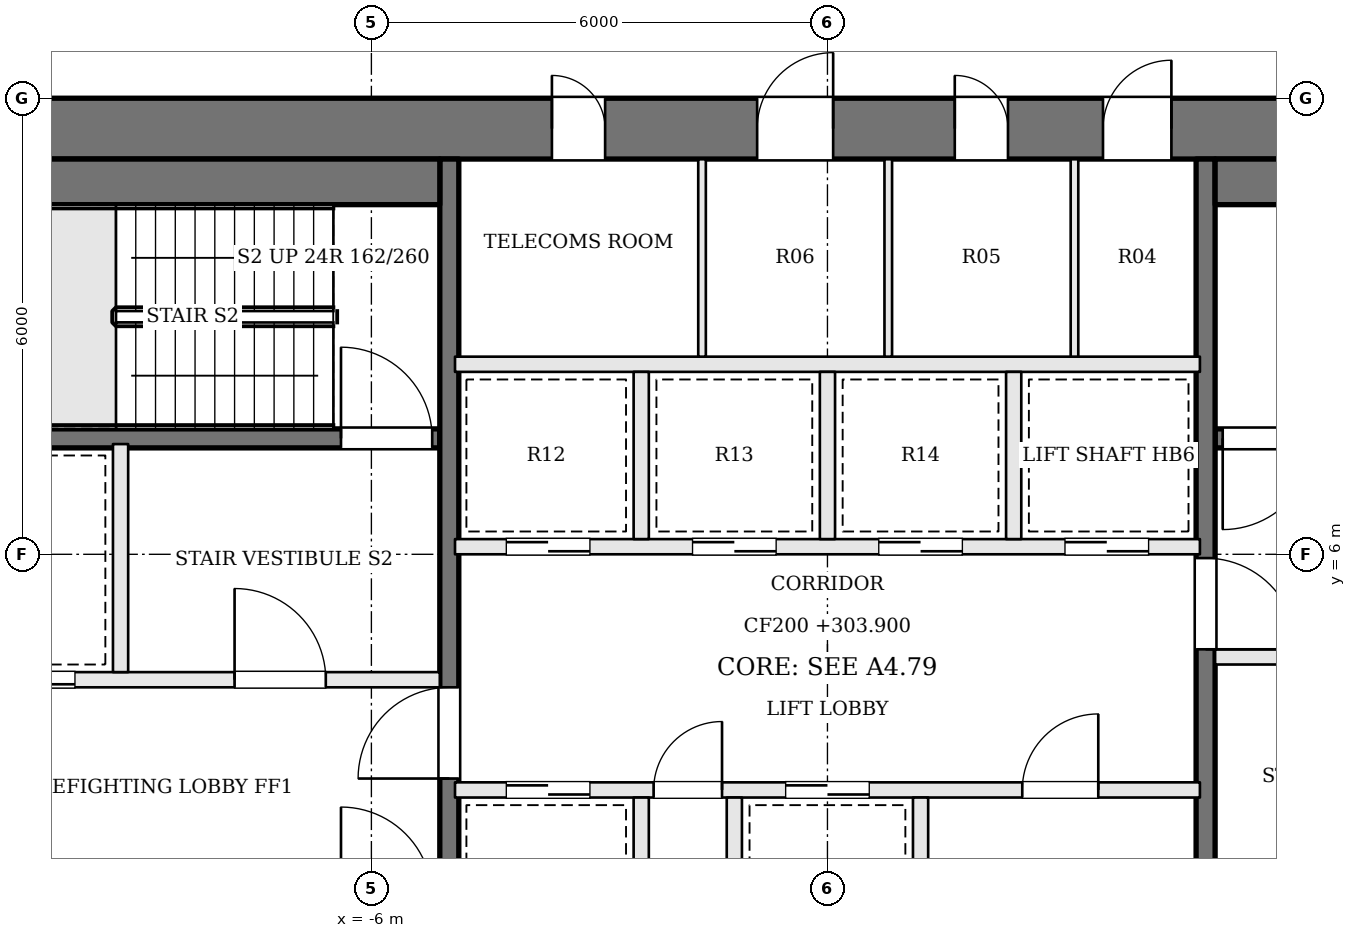
"""IFC4 building model, lengths in metres.
Left out: names, types, materials, properties, quantities, classifications, styles, units other than length and angle.
Written with IfcOpenShell. Run it as: python <this file> out.ifc"""

import sys

from ifc_helpers import new_model, si_unit, direction, frame, frame_2d, origin, place, context, subcontext, project, spatial, rectangle, extrude, element, fill, save


model = new_model("IFC4")
c1 = context("Model", 3, precision=1e-05, world=origin(), true_north=direction((0.0, 1.0)))
c2 = subcontext(c1, "Body", "Model", "MODEL_VIEW")
j1 = project(units=[si_unit("LENGTHUNIT", "METRE"), si_unit("PLANEANGLEUNIT", "RADIAN")], contexts=[c1])
p1 = place(None, origin())
s1 = spatial("IfcSite", under=j1, at=p1, CompositionType="ELEMENT")
p2 = place(p1, origin())
s2 = spatial("IfcBuilding", under=s1, at=p2, CompositionType="ELEMENT")
p3 = place(p2, frame((0.0, 0.0, 303.9)))
s3 = spatial("IfcBuildingStorey", under=s2, at=p3, CompositionType="ELEMENT", Elevation=303.9)
p4 = place(p3, frame((-13.0, 11.6, 0.0), z_axis=(0.0, 0.0, 1.0), x_axis=(1.0, 0.0, 0.0)))
e1 = element("IfcWall", 1, at=p4, inside=s3, PredefinedType="SHEAR", context=c2, shape_type="SweptSolid", body=[
    extrude(rectangle(XDim=26.0, YDim=0.8, at=frame_2d((13.0, 0.0))), origin(), (0.0, 0.0, 1.0), 3.9),
])
p5 = place(p4, frame((9.375, 0.0, 0.0)))
e2 = element("IfcOpeningElement", 2, at=p5, cuts=e1, PredefinedType="OPENING", context=c2, shape_type="SweptSolid", body=[
    extrude(rectangle(XDim=0.7, YDim=2.1, at=frame_2d((0.35, 1.05))), frame((0.0, 0.41, 0.0), z_axis=(0.0, -1.0, 0.0), x_axis=(1.0, 0.0, 0.0)), (0.0, 0.0, 1.0), 0.82),
])
p6 = place(p4, frame((12.075, 0.0, 0.0)))
e3 = element("IfcOpeningElement", 3, at=p6, cuts=e1, PredefinedType="OPENING", context=c2, shape_type="SweptSolid", body=[
    extrude(rectangle(XDim=1.0, YDim=2.1, at=frame_2d((0.5, 1.05))), frame((0.0, 0.41, 0.0), z_axis=(0.0, -1.0, 0.0), x_axis=(1.0, 0.0, 0.0)), (0.0, 0.0, 1.0), 0.82),
])
p7 = place(p4, frame((14.675, 0.0, 0.0)))
e4 = element("IfcOpeningElement", 4, at=p7, cuts=e1, PredefinedType="OPENING", context=c2, shape_type="SweptSolid", body=[
    extrude(rectangle(XDim=0.7, YDim=2.1, at=frame_2d((0.35, 1.05))), frame((0.0, 0.41, 0.0), z_axis=(0.0, -1.0, 0.0), x_axis=(1.0, 0.0, 0.0)), (0.0, 0.0, 1.0), 0.82),
])
p8 = place(p4, frame((16.625, 0.0, 0.0)))
e5 = element("IfcOpeningElement", 5, at=p8, cuts=e1, PredefinedType="OPENING", context=c2, shape_type="SweptSolid", body=[
    extrude(rectangle(XDim=0.9, YDim=2.1, at=frame_2d((0.45, 1.05))), frame((0.0, 0.41, 0.0), z_axis=(0.0, -1.0, 0.0), x_axis=(1.0, 0.0, 0.0)), (0.0, 0.0, 1.0), 0.82),
])
p9 = place(p3, frame((12.2, 7.525, 0.0), z_axis=(0.0, 0.0, 1.0), x_axis=(-1.0, 0.0, 0.0)))
e6 = element("IfcWall", 6, at=p9, inside=s3, PredefinedType="SOLIDWALL", context=c2, shape_type="SweptSolid", body=[
    extrude(rectangle(XDim=7.1, YDim=0.25, at=frame_2d((3.55, 0.0))), origin(), (0.0, 0.0, 1.0), 3.7),
])
p10 = place(p9, frame((5.8, 0.0, 0.0)))
e7 = element("IfcOpeningElement", 7, at=p10, cuts=e6, PredefinedType="OPENING", context=c2, shape_type="SweptSolid", body=[
    extrude(rectangle(XDim=1.2, YDim=2.1, at=frame_2d((0.6, 1.05))), frame((0.0, 0.135, 0.0), z_axis=(0.0, -1.0, 0.0), x_axis=(1.0, 0.0, 0.0)), (0.0, 0.0, 1.0), 0.27),
])
p11 = place(p3, frame((-12.2, 4.35, 0.0), z_axis=(0.0, 0.0, 1.0), x_axis=(1.0, 0.0, 0.0)))
e8 = element("IfcWall", 8, at=p11, inside=s3, PredefinedType="SOLIDWALL", context=c2, shape_type="SweptSolid", body=[
    extrude(rectangle(XDim=7.1, YDim=0.2, at=frame_2d((3.55, 0.0))), origin(), (0.0, 0.0, 1.0), 3.7),
])
p12 = place(p11, frame((4.4, 0.0, 0.0)))
e9 = element("IfcOpeningElement", 9, at=p12, cuts=e8, PredefinedType="OPENING", context=c2, shape_type="SweptSolid", body=[
    extrude(rectangle(XDim=1.2, YDim=2.1, at=frame_2d((0.6, 1.05))), frame((0.0, 0.11, 0.0), z_axis=(0.0, -1.0, 0.0), x_axis=(1.0, 0.0, 0.0)), (0.0, 0.0, 1.0), 0.22),
])
p13 = place(p11, frame((1.1, 0.0, 0.0)))
e10 = element("IfcOpeningElement", 10, at=p13, cuts=e8, PredefinedType="OPENING", context=c2, shape_type="SweptSolid", body=[
    extrude(rectangle(XDim=1.2, YDim=2.1, at=frame_2d((0.6, 1.05))), frame((0.0, 0.11, 0.0), z_axis=(0.0, -1.0, 0.0), x_axis=(1.0, 0.0, 0.0)), (0.0, 0.0, 1.0), 0.22),
])
p14 = place(p3, frame((12.2, 4.65, 0.0), z_axis=(0.0, 0.0, 1.0), x_axis=(-1.0, 0.0, 0.0)))
e11 = element("IfcWall", 11, at=p14, inside=s3, PredefinedType="SOLIDWALL", context=c2, shape_type="SweptSolid", body=[
    extrude(rectangle(XDim=7.1, YDim=0.2, at=frame_2d((3.55, 0.0))), origin(), (0.0, 0.0, 1.0), 3.7),
])
p15 = place(p14, frame((4.4, 0.0, 0.0)))
e12 = element("IfcOpeningElement", 12, at=p15, cuts=e11, PredefinedType="OPENING", context=c2, shape_type="SweptSolid", body=[
    extrude(rectangle(XDim=1.2, YDim=2.1, at=frame_2d((0.6, 1.05))), frame((0.0, 0.11, 0.0), z_axis=(0.0, -1.0, 0.0), x_axis=(1.0, 0.0, 0.0)), (0.0, 0.0, 1.0), 0.22),
])
p16 = place(p14, frame((1.1, 0.0, 0.0)))
e13 = element("IfcOpeningElement", 13, at=p16, cuts=e11, PredefinedType="OPENING", context=c2, shape_type="SweptSolid", body=[
    extrude(rectangle(XDim=1.2, YDim=2.1, at=frame_2d((0.6, 1.05))), frame((0.0, 0.11, 0.0), z_axis=(0.0, -1.0, 0.0), x_axis=(1.0, 0.0, 0.0)), (0.0, 0.0, 1.0), 0.22),
])
p17 = place(p3, frame((-12.2, 7.525, 0.0), z_axis=(0.0, 0.0, 1.0), x_axis=(1.0, 0.0, 0.0)))
e14 = element("IfcWall", 14, at=p17, inside=s3, PredefinedType="SOLIDWALL", context=c2, shape_type="SweptSolid", body=[
    extrude(rectangle(XDim=7.1, YDim=0.25, at=frame_2d((3.55, 0.0))), origin(), (0.0, 0.0, 1.0), 3.7),
])
p18 = place(p17, frame((5.8, 0.0, 0.0)))
e15 = element("IfcOpeningElement", 15, at=p18, cuts=e14, PredefinedType="OPENING", context=c2, shape_type="SweptSolid", body=[
    extrude(rectangle(XDim=1.2, YDim=2.1, at=frame_2d((0.6, 1.05))), frame((0.0, 0.135, 0.0), z_axis=(0.0, -1.0, 0.0), x_axis=(1.0, 0.0, 0.0)), (0.0, 0.0, 1.0), 0.27),
])
p19 = place(p3, frame((-9.3, 4.45, 0.0), z_axis=(0.0, 0.0, 1.0), x_axis=(0.0, 1.0, 0.0)))
e16 = element("IfcWall", 16, at=p19, inside=s3, PredefinedType="SOLIDWALL", context=c2, shape_type="SweptSolid", body=[
    extrude(rectangle(XDim=3.0, YDim=0.2, at=frame_2d((1.5, 0.0))), origin(), (0.0, 0.0, 1.0), 3.7),
])
p20 = place(p3, frame((-4.975, -2.2, 0.0), z_axis=(0.0, 0.0, 1.0), x_axis=(0.0, 1.0, 0.0)))
e17 = element("IfcWall", 17, at=p20, inside=s3, PredefinedType="SOLIDWALL", context=c2, shape_type="SweptSolid", body=[
    extrude(rectangle(XDim=13.4, YDim=0.25, at=frame_2d((6.7, 0.0))), origin(), (0.0, 0.0, 1.0), 3.7),
])
p21 = place(p20, frame((5.25, 0.0, 0.0)))
e18 = element("IfcOpeningElement", 18, at=p21, cuts=e17, PredefinedType="OPENING", context=c2, shape_type="SweptSolid", body=[
    extrude(rectangle(XDim=1.2, YDim=2.1, at=frame_2d((0.6, 1.05))), frame((0.0, 0.135, 0.0), z_axis=(0.0, -1.0, 0.0), x_axis=(1.0, 0.0, 0.0)), (0.0, 0.0, 1.0), 0.27),
])
p22 = place(p3, frame((4.975, 11.2, 0.0), z_axis=(0.0, 0.0, 1.0), x_axis=(0.0, -1.0, 0.0)))
e19 = element("IfcWall", 19, at=p22, inside=s3, PredefinedType="SOLIDWALL", context=c2, shape_type="SweptSolid", body=[
    extrude(rectangle(XDim=13.4, YDim=0.25, at=frame_2d((6.7, 0.0))), origin(), (0.0, 0.0, 1.0), 3.7),
])
p23 = place(p22, frame((5.25, 0.0, 0.0)))
e20 = element("IfcOpeningElement", 20, at=p23, cuts=e19, PredefinedType="OPENING", context=c2, shape_type="SweptSolid", body=[
    extrude(rectangle(XDim=1.2, YDim=2.1, at=frame_2d((0.6, 1.05))), frame((0.0, 0.135, 0.0), z_axis=(0.0, -1.0, 0.0), x_axis=(1.0, 0.0, 0.0)), (0.0, 0.0, 1.0), 0.27),
])
for number, where, z_axis, x_axis in (
    (21, (-12.2, 10.9, 0.0), (0.0, 0.0, 1.0), (1.0, 0.0, 0.0)),
    (22, (12.2, 10.9, 0.0), (0.0, 0.0, 1.0), (-1.0, 0.0, 0.0)),
):
    element("IfcWall", number, at=place(p3, frame(where, z_axis=z_axis, x_axis=x_axis)), inside=s3, PredefinedType="SOLIDWALL", context=c2, shape_type="SweptSolid", body=[
        extrude(rectangle(XDim=7.1, YDim=0.6, at=frame_2d((3.55, 0.0))), origin(), (0.0, 0.0, 1.0), 3.7),
    ])
p24 = place(p3, frame((-4.9, 2.9, 0.0), z_axis=(0.0, 0.0, 1.0), x_axis=(1.0, 0.0, 0.0)))
e23 = element("IfcWall", 23, at=p24, inside=s3, PredefinedType="SOLIDWALL", context=c2, shape_type="SweptSolid", body=[
    extrude(rectangle(XDim=9.8, YDim=0.2, at=frame_2d((4.9, 0.0))), origin(), (0.0, 0.0, 1.0), 3.7),
])
p25 = place(p24, frame((0.675, 0.0, 0.0)))
e24 = element("IfcOpeningElement", 24, at=p25, cuts=e23, PredefinedType="OPENING", context=c2, shape_type="SweptSolid", body=[
    extrude(rectangle(XDim=1.1, YDim=2.1, at=frame_2d((0.55, 1.05))), frame((0.0, 0.11, 0.0), z_axis=(0.0, -1.0, 0.0), x_axis=(1.0, 0.0, 0.0)), (0.0, 0.0, 1.0), 0.22),
])
p26 = place(p24, frame((2.613, 0.0, 0.0)))
e25 = element("IfcOpeningElement", 25, at=p26, cuts=e23, PredefinedType="OPENING", context=c2, shape_type="SweptSolid", body=[
    extrude(rectangle(XDim=0.9, YDim=2.1, at=frame_2d((0.45, 1.05))), frame((0.0, 0.11, 0.0), z_axis=(0.0, -1.0, 0.0), x_axis=(1.0, 0.0, 0.0)), (0.0, 0.0, 1.0), 0.22),
])
p27 = place(p24, frame((4.35, 0.0, 0.0)))
e26 = element("IfcOpeningElement", 26, at=p27, cuts=e23, PredefinedType="OPENING", context=c2, shape_type="SweptSolid", body=[
    extrude(rectangle(XDim=1.1, YDim=2.1, at=frame_2d((0.55, 1.05))), frame((0.0, 0.11, 0.0), z_axis=(0.0, -1.0, 0.0), x_axis=(1.0, 0.0, 0.0)), (0.0, 0.0, 1.0), 0.22),
])
p28 = place(p24, frame((7.463, 0.0, 0.0)))
e27 = element("IfcOpeningElement", 27, at=p28, cuts=e23, PredefinedType="OPENING", context=c2, shape_type="SweptSolid", body=[
    extrude(rectangle(XDim=1.0, YDim=2.1, at=frame_2d((0.5, 1.05))), frame((0.0, 0.11, 0.0), z_axis=(0.0, -1.0, 0.0), x_axis=(1.0, 0.0, 0.0)), (0.0, 0.0, 1.0), 0.22),
])
p29 = place(p3, frame((-4.9, 6.1, 0.0), z_axis=(0.0, 0.0, 1.0), x_axis=(1.0, 0.0, 0.0)))
e28 = element("IfcWall", 28, at=p29, inside=s3, PredefinedType="SOLIDWALL", context=c2, shape_type="SweptSolid", body=[
    extrude(rectangle(XDim=9.8, YDim=0.2, at=frame_2d((4.9, 0.0))), origin(), (0.0, 0.0, 1.0), 3.7),
])
p30 = place(p29, frame((0.675, 0.0, 0.0)))
e29 = element("IfcOpeningElement", 29, at=p30, cuts=e28, PredefinedType="OPENING", context=c2, shape_type="SweptSolid", body=[
    extrude(rectangle(XDim=1.1, YDim=2.1, at=frame_2d((0.55, 1.05))), frame((0.0, 0.11, 0.0), z_axis=(0.0, -1.0, 0.0), x_axis=(1.0, 0.0, 0.0)), (0.0, 0.0, 1.0), 0.22),
])
p31 = place(p29, frame((3.125, 0.0, 0.0)))
e30 = element("IfcOpeningElement", 30, at=p31, cuts=e28, PredefinedType="OPENING", context=c2, shape_type="SweptSolid", body=[
    extrude(rectangle(XDim=1.1, YDim=2.1, at=frame_2d((0.55, 1.05))), frame((0.0, 0.11, 0.0), z_axis=(0.0, -1.0, 0.0), x_axis=(1.0, 0.0, 0.0)), (0.0, 0.0, 1.0), 0.22),
])
p32 = place(p29, frame((5.575, 0.0, 0.0)))
e31 = element("IfcOpeningElement", 31, at=p32, cuts=e28, PredefinedType="OPENING", context=c2, shape_type="SweptSolid", body=[
    extrude(rectangle(XDim=1.1, YDim=2.1, at=frame_2d((0.55, 1.05))), frame((0.0, 0.11, 0.0), z_axis=(0.0, -1.0, 0.0), x_axis=(1.0, 0.0, 0.0)), (0.0, 0.0, 1.0), 0.22),
])
p33 = place(p29, frame((8.025, 0.0, 0.0)))
e32 = element("IfcOpeningElement", 32, at=p33, cuts=e28, PredefinedType="OPENING", context=c2, shape_type="SweptSolid", body=[
    extrude(rectangle(XDim=1.1, YDim=2.1, at=frame_2d((0.55, 1.05))), frame((0.0, 0.11, 0.0), z_axis=(0.0, -1.0, 0.0), x_axis=(1.0, 0.0, 0.0)), (0.0, 0.0, 1.0), 0.22),
])
p34 = place(p3, frame((-4.9, 8.5, 0.0), z_axis=(0.0, 0.0, 1.0), x_axis=(1.0, 0.0, 0.0)))
e33 = element("IfcWall", 33, at=p34, inside=s3, PredefinedType="SOLIDWALL", context=c2, shape_type="SweptSolid", body=[
    extrude(rectangle(XDim=9.8, YDim=0.2, at=frame_2d((4.9, 0.0))), origin(), (0.0, 0.0, 1.0), 3.7),
])
for number, where, z_axis, x_axis in (
    (34, (-2.45, 0.6, 0.0), (0.0, 0.0, 1.0), (0.0, 1.0, 0.0)),
    (35, (-1.225, 0.6, 0.0), (0.0, 0.0, 1.0), (0.0, 1.0, 0.0)),
    (36, (1.225, 0.6, 0.0), (0.0, 0.0, 1.0), (0.0, 1.0, 0.0)),
    (37, (-2.45, 6.2, 0.0), (0.0, 0.0, 1.0), (0.0, 1.0, 0.0)),
    (38, (0.0, 6.2, 0.0), (0.0, 0.0, 1.0), (0.0, 1.0, 0.0)),
    (39, (2.45, 6.2, 0.0), (0.0, 0.0, 1.0), (0.0, 1.0, 0.0)),
):
    element("IfcWall", number, at=place(p3, frame(where, z_axis=z_axis, x_axis=x_axis)), inside=s3, PredefinedType="SOLIDWALL", context=c2, shape_type="SweptSolid", body=[
        extrude(rectangle(XDim=2.2, YDim=0.2, at=frame_2d((1.1, 0.0))), origin(), (0.0, 0.0, 1.0), 3.7),
    ])
for number, where, z_axis, x_axis in (
    (40, (-1.65, 8.6, 0.0), (0.0, 0.0, 1.0), (0.0, 1.0, 0.0)),
    (41, (0.8, 8.6, 0.0), (0.0, 0.0, 1.0), (0.0, 1.0, 0.0)),
    (42, (3.25, 8.6, 0.0), (0.0, 0.0, 1.0), (0.0, 1.0, 0.0)),
):
    element("IfcWall", number, at=place(p3, frame(where, z_axis=z_axis, x_axis=x_axis)), inside=s3, PredefinedType="PARTITIONING", context=c2, shape_type="SweptSolid", body=[
        extrude(rectangle(XDim=2.6, YDim=0.1, at=frame_2d((1.3, 0.0))), origin(), (0.0, 0.0, 1.0), 3.7),
    ])
p35 = place(p21, origin())
e43 = element("IfcDoor", 43, at=p35, inside=s3, OperationType="SINGLE_SWING_LEFT", PredefinedType="DOOR", context=c2, shape_type="SweptSolid", body=[
    extrude(rectangle(XDim=1.2, YDim=2.1, at=frame_2d((0.6, 1.05))), frame((0.0, 0.025, 0.0), z_axis=(0.0, -1.0, 0.0), x_axis=(1.0, 0.0, 0.0)), (0.0, 0.0, 1.0), 0.05),
])
fill(e18, e43)
p36 = place(p23, origin())
e44 = element("IfcDoor", 44, at=p36, inside=s3, OperationType="SINGLE_SWING_RIGHT", PredefinedType="DOOR", context=c2, shape_type="SweptSolid", body=[
    extrude(rectangle(XDim=1.2, YDim=2.1, at=frame_2d((0.6, 1.05))), frame((0.0, 0.025, 0.0), z_axis=(0.0, -1.0, 0.0), x_axis=(1.0, 0.0, 0.0)), (0.0, 0.0, 1.0), 0.05),
])
fill(e20, e44)
p37 = place(p12, origin())
e45 = element("IfcDoor", 45, at=p37, inside=s3, OperationType="SINGLE_SWING_LEFT", PredefinedType="DOOR", context=c2, shape_type="SweptSolid", body=[
    extrude(rectangle(XDim=1.2, YDim=2.1, at=frame_2d((0.6, 1.05))), frame((0.0, 0.025, 0.0), z_axis=(0.0, -1.0, 0.0), x_axis=(1.0, 0.0, 0.0)), (0.0, 0.0, 1.0), 0.05),
])
fill(e9, e45)
p38 = place(p10, origin())
e46 = element("IfcDoor", 46, at=p38, inside=s3, OperationType="SINGLE_SWING_RIGHT", PredefinedType="DOOR", context=c2, shape_type="SweptSolid", body=[
    extrude(rectangle(XDim=1.2, YDim=2.1, at=frame_2d((0.6, 1.05))), frame((0.0, 0.025, 0.0), z_axis=(0.0, -1.0, 0.0), x_axis=(1.0, 0.0, 0.0)), (0.0, 0.0, 1.0), 0.05),
])
fill(e7, e46)
p39 = place(p18, origin())
e47 = element("IfcDoor", 47, at=p39, inside=s3, OperationType="SINGLE_SWING_LEFT", PredefinedType="DOOR", context=c2, shape_type="SweptSolid", body=[
    extrude(rectangle(XDim=1.2, YDim=2.1, at=frame_2d((0.6, 1.05))), frame((0.0, 0.025, 0.0), z_axis=(0.0, -1.0, 0.0), x_axis=(1.0, 0.0, 0.0)), (0.0, 0.0, 1.0), 0.05),
])
fill(e15, e47)
p40 = place(p13, origin())
e48 = element("IfcDoor", 48, at=p40, inside=s3, OperationType="SLIDING_TO_RIGHT", PredefinedType="DOOR", context=c2, shape_type="SweptSolid", body=[
    extrude(rectangle(XDim=1.2, YDim=2.1, at=frame_2d((0.6, 1.05))), frame((0.0, 0.025, 0.0), z_axis=(0.0, -1.0, 0.0), x_axis=(1.0, 0.0, 0.0)), (0.0, 0.0, 1.0), 0.05),
])
fill(e10, e48)
p41 = place(p25, origin())
e49 = element("IfcDoor", 49, at=p41, inside=s3, OperationType="SLIDING_TO_RIGHT", PredefinedType="DOOR", context=c2, shape_type="SweptSolid", body=[
    extrude(rectangle(XDim=1.1, YDim=2.1, at=frame_2d((0.55, 1.05))), frame((0.0, 0.025, 0.0), z_axis=(0.0, -1.0, 0.0), x_axis=(1.0, 0.0, 0.0)), (0.0, 0.0, 1.0), 0.05),
])
fill(e24, e49)
p42 = place(p26, origin())
e50 = element("IfcDoor", 50, at=p42, inside=s3, OperationType="SINGLE_SWING_RIGHT", PredefinedType="DOOR", context=c2, shape_type="SweptSolid", body=[
    extrude(rectangle(XDim=0.9, YDim=2.1, at=frame_2d((0.45, 1.05))), frame((0.0, 0.025, 0.0), z_axis=(0.0, -1.0, 0.0), x_axis=(1.0, 0.0, 0.0)), (0.0, 0.0, 1.0), 0.05),
])
fill(e25, e50)
p43 = place(p27, origin())
e51 = element("IfcDoor", 51, at=p43, inside=s3, OperationType="SLIDING_TO_LEFT", PredefinedType="DOOR", context=c2, shape_type="SweptSolid", body=[
    extrude(rectangle(XDim=1.1, YDim=2.1, at=frame_2d((0.55, 1.05))), frame((0.0, 0.025, 0.0), z_axis=(0.0, -1.0, 0.0), x_axis=(1.0, 0.0, 0.0)), (0.0, 0.0, 1.0), 0.05),
])
fill(e26, e51)
p44 = place(p28, origin())
e52 = element("IfcDoor", 52, at=p44, inside=s3, OperationType="SINGLE_SWING_RIGHT", PredefinedType="DOOR", context=c2, shape_type="SweptSolid", body=[
    extrude(rectangle(XDim=1.0, YDim=2.1, at=frame_2d((0.5, 1.05))), frame((0.0, 0.025, 0.0), z_axis=(0.0, -1.0, 0.0), x_axis=(1.0, 0.0, 0.0)), (0.0, 0.0, 1.0), 0.05),
])
fill(e27, e52)
p45 = place(p30, origin())
e53 = element("IfcDoor", 53, at=p45, inside=s3, OperationType="SLIDING_TO_RIGHT", PredefinedType="DOOR", context=c2, shape_type="SweptSolid", body=[
    extrude(rectangle(XDim=1.1, YDim=2.1, at=frame_2d((0.55, 1.05))), frame((0.0, 0.025, 0.0), z_axis=(0.0, -1.0, 0.0), x_axis=(1.0, 0.0, 0.0)), (0.0, 0.0, 1.0), 0.05),
])
fill(e29, e53)
p46 = place(p31, origin())
e54 = element("IfcDoor", 54, at=p46, inside=s3, OperationType="SLIDING_TO_LEFT", PredefinedType="DOOR", context=c2, shape_type="SweptSolid", body=[
    extrude(rectangle(XDim=1.1, YDim=2.1, at=frame_2d((0.55, 1.05))), frame((0.0, 0.025, 0.0), z_axis=(0.0, -1.0, 0.0), x_axis=(1.0, 0.0, 0.0)), (0.0, 0.0, 1.0), 0.05),
])
fill(e30, e54)
p47 = place(p32, origin())
e55 = element("IfcDoor", 55, at=p47, inside=s3, OperationType="SLIDING_TO_RIGHT", PredefinedType="DOOR", context=c2, shape_type="SweptSolid", body=[
    extrude(rectangle(XDim=1.1, YDim=2.1, at=frame_2d((0.55, 1.05))), frame((0.0, 0.025, 0.0), z_axis=(0.0, -1.0, 0.0), x_axis=(1.0, 0.0, 0.0)), (0.0, 0.0, 1.0), 0.05),
])
fill(e31, e55)
p48 = place(p33, origin())
e56 = element("IfcDoor", 56, at=p48, inside=s3, OperationType="SLIDING_TO_LEFT", PredefinedType="DOOR", context=c2, shape_type="SweptSolid", body=[
    extrude(rectangle(XDim=1.1, YDim=2.1, at=frame_2d((0.55, 1.05))), frame((0.0, 0.025, 0.0), z_axis=(0.0, -1.0, 0.0), x_axis=(1.0, 0.0, 0.0)), (0.0, 0.0, 1.0), 0.05),
])
fill(e32, e56)
p49 = place(p5, origin())
e57 = element("IfcDoor", 57, at=p49, inside=s3, OperationType="SINGLE_SWING_LEFT", PredefinedType="DOOR", context=c2, shape_type="SweptSolid", body=[
    extrude(rectangle(XDim=0.7, YDim=2.1, at=frame_2d((0.35, 1.05))), frame((0.0, 0.025, 0.0), z_axis=(0.0, -1.0, 0.0), x_axis=(1.0, 0.0, 0.0)), (0.0, 0.0, 1.0), 0.05),
])
fill(e2, e57)
p50 = place(p6, origin())
e58 = element("IfcDoor", 58, at=p50, inside=s3, OperationType="SINGLE_SWING_RIGHT", PredefinedType="DOOR", context=c2, shape_type="SweptSolid", body=[
    extrude(rectangle(XDim=1.0, YDim=2.1, at=frame_2d((0.5, 1.05))), frame((0.0, 0.025, 0.0), z_axis=(0.0, -1.0, 0.0), x_axis=(1.0, 0.0, 0.0)), (0.0, 0.0, 1.0), 0.05),
])
fill(e3, e58)
p51 = place(p7, origin())
e59 = element("IfcDoor", 59, at=p51, inside=s3, OperationType="SINGLE_SWING_LEFT", PredefinedType="DOOR", context=c2, shape_type="SweptSolid", body=[
    extrude(rectangle(XDim=0.7, YDim=2.1, at=frame_2d((0.35, 1.05))), frame((0.0, 0.025, 0.0), z_axis=(0.0, -1.0, 0.0), x_axis=(1.0, 0.0, 0.0)), (0.0, 0.0, 1.0), 0.05),
])
fill(e4, e59)
p52 = place(p8, origin())
e60 = element("IfcDoor", 60, at=p52, inside=s3, OperationType="SINGLE_SWING_RIGHT", PredefinedType="DOOR", context=c2, shape_type="SweptSolid", body=[
    extrude(rectangle(XDim=0.9, YDim=2.1, at=frame_2d((0.45, 1.05))), frame((0.0, 0.025, 0.0), z_axis=(0.0, -1.0, 0.0), x_axis=(1.0, 0.0, 0.0)), (0.0, 0.0, 1.0), 0.05),
])
fill(e5, e60)
save(model, sys.argv[1])
